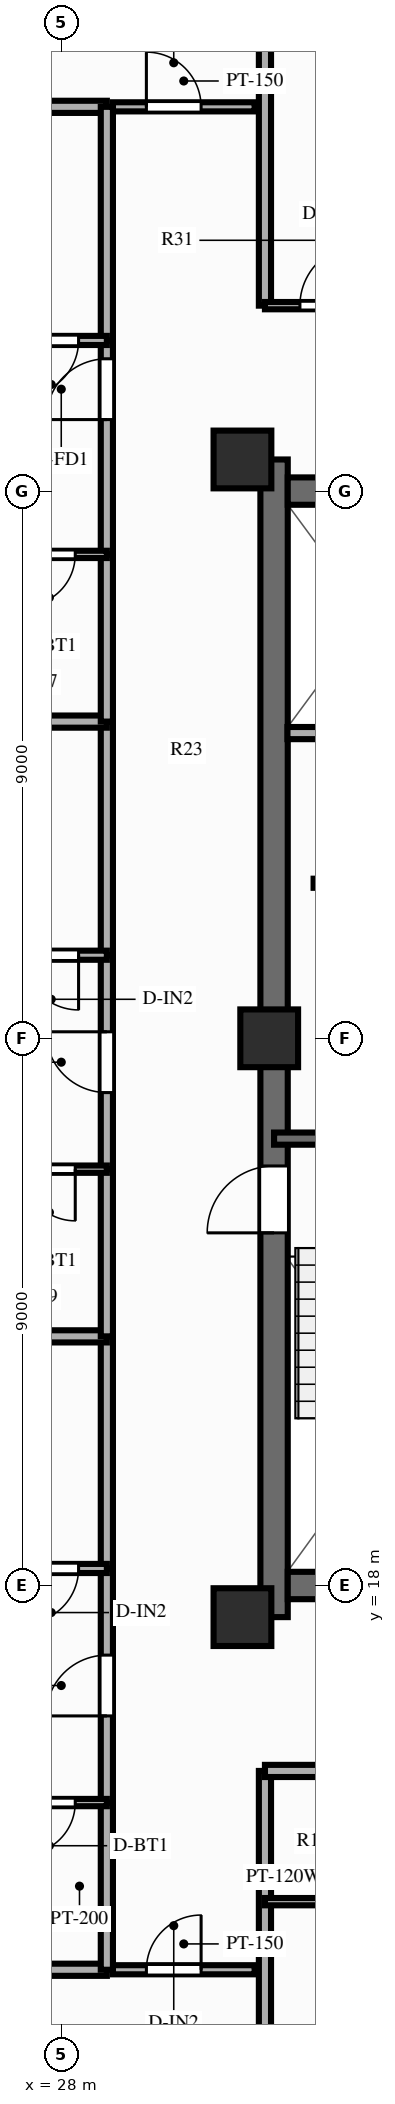
"""IFC4 building model, lengths in metres.
Left out: names, types, materials, properties, quantities, classifications, styles, units other than length and angle.
Written with IfcOpenShell. Run it as: python <this file> out.ifc"""

import sys

from ifc_helpers import new_model, si_unit, direction, frame, frame_2d, origin, origin_2d, place, context, subcontext, project, spatial, rectangle, extrude, source, transform, mapped, element, fill, save


model = new_model("IFC4")
c1 = context("Model", 3, precision=1e-05, world=origin(), true_north=direction((0.0, 1.0)))
c2 = subcontext(c1, "Body", "Model", "MODEL_VIEW")
j1 = project(units=[si_unit("LENGTHUNIT", "METRE"), si_unit("PLANEANGLEUNIT", "RADIAN")], contexts=[c1])
p1 = place(None, origin())
s1 = spatial("IfcSite", under=j1, at=p1, CompositionType="ELEMENT")
p2 = place(p1, origin())
s2 = spatial("IfcBuilding", under=s1, at=p2, CompositionType="ELEMENT")
p3 = place(p2, frame((0.0, 0.0, 216.3)))
s3 = spatial("IfcBuildingStorey", under=s2, at=p3, CompositionType="ELEMENT", Elevation=216.3)
p4 = place(p3, frame((31.5, 17.48, 0.0), z_axis=(0.0, 0.0, 1.0), x_axis=(0.0, 1.0, 0.0)))
e1 = element("IfcWall", 1, at=p4, inside=s3, PredefinedType="SHEAR", context=c2, shape_type="SweptSolid", body=[
    extrude(rectangle(XDim=19.04, YDim=0.45, at=frame_2d((9.52, 0.0))), origin(), (0.0, 0.0, 1.0), 3.9),
])
p5 = place(p4, frame((6.32, 0.0, 0.0)))
e2 = element("IfcOpeningElement", 2, at=p5, cuts=e1, PredefinedType="OPENING", context=c2, shape_type="SweptSolid", body=[
    extrude(rectangle(XDim=1.1, YDim=2.15, at=frame_2d((0.55, 1.075))), frame((0.0, 0.237, 0.0), z_axis=(0.0, -1.0, 0.0), x_axis=(1.0, 0.0, 0.0)), (0.0, 0.0, 1.0), 0.474),
])
p6 = place(p3, frame((31.725, 18.0, 0.0), z_axis=(0.0, 0.0, 1.0), x_axis=(1.0, 0.0, 0.0)))
e3 = element("IfcWall", 3, at=p6, inside=s3, PredefinedType="SHEAR", context=c2, shape_type="SweptSolid", body=[
    extrude(rectangle(XDim=12.55, YDim=0.45, at=frame_2d((6.275, 0.0))), origin(), (0.0, 0.0, 1.0), 3.9),
])
p7 = place(p3, frame((31.725, 36.0, 0.0), z_axis=(0.0, 0.0, 1.0), x_axis=(1.0, 0.0, 0.0)))
e4 = element("IfcWall", 4, at=p7, inside=s3, PredefinedType="SHEAR", context=c2, shape_type="SweptSolid", body=[
    extrude(rectangle(XDim=12.55, YDim=0.45, at=frame_2d((6.275, 0.0))), origin(), (0.0, 0.0, 1.0), 3.9),
])
p8 = place(p7, frame((5.225, 0.0, 0.0), z_axis=(0.0, 0.0, 1.0), x_axis=(-1.0, 0.0, 0.0)))
e5 = element("IfcOpeningElement", 5, at=p8, cuts=e4, PredefinedType="OPENING", context=c2, shape_type="SweptSolid", body=[
    extrude(rectangle(XDim=1.4, YDim=2.15, at=frame_2d((0.7, 1.075))), frame((0.0, 0.237, 0.0), z_axis=(0.0, -1.0, 0.0), x_axis=(1.0, 0.0, 0.0)), (0.0, 0.0, 1.0), 0.474),
])
m1 = source(origin(), c2, "Body", "SweptSolid", [
    extrude(rectangle(XDim=0.95, YDim=0.95, at=origin_2d()), origin(), (0.0, 0.0, 1.0), 3.9),
])
for number, where, z_axis, x_axis in (
    (6, (30.98, 17.48, 0.0), (0.0, 0.0, 1.0), (1.0, 0.0, 0.0)),
    (7, (30.98, 36.52, 0.0), (0.0, 0.0, 1.0), (1.0, 0.0, 0.0)),
    (8, (31.42, 27.0, 0.0), (0.0, 0.0, 1.0), (1.0, 0.0, 0.0)),
):
    element("IfcColumn", number, at=place(p3, frame(where, z_axis=z_axis, x_axis=x_axis)), inside=s3, PredefinedType="COLUMN", context=c2, shape_type="MappedRepresentation", body=[
        mapped(m1, transform((0.0, 0.0, 0.0), scale=1.0)),
    ])
p9 = place(p3, frame((32.15, 29.55, 0.0), z_axis=(0.0, 0.0, 1.0), x_axis=(1.0, 0.0, 0.0)))
e9 = element("IfcWall", 9, at=p9, inside=s3, PredefinedType="PARTITIONING", context=c2, shape_type="SweptSolid", body=[
    extrude(rectangle(XDim=2.27, YDim=0.15, at=frame_2d((1.135, 0.0))), origin(), (0.0, 0.0, 1.0), 3.56),
])
p10 = place(p3, frame((31.5, 25.35, 0.0), z_axis=(0.0, 0.0, 1.0), x_axis=(1.0, 0.0, 0.0)))
e10 = element("IfcWall", 10, at=p10, inside=s3, PredefinedType="SOLIDWALL", context=c2, shape_type="SweptSolid", body=[
    extrude(rectangle(XDim=3.93, YDim=0.2, at=frame_2d((1.965, 0.0))), origin(), (0.0, 0.0, 1.0), 3.69),
])
p11 = place(p3, frame((31.72, 32.02, 0.0), z_axis=(0.0, 0.0, 1.0), x_axis=(1.0, 0.0, 0.0)))
e11 = element("IfcWall", 11, at=p11, inside=s3, PredefinedType="PARTITIONING", context=c2, shape_type="SweptSolid", body=[
    extrude(rectangle(XDim=2.8, YDim=0.2, at=frame_2d((1.4, 0.0))), origin(), (0.0, 0.0, 1.0), 3.56),
])
p12 = place(p3, frame((28.85, 11.68, 0.0), z_axis=(0.0, 0.0, 1.0), x_axis=(1.0, 0.0, 0.0)))
e12 = element("IfcWall", 12, at=p12, inside=s3, PredefinedType="PARTITIONING", context=c2, shape_type="SweptSolid", body=[
    extrude(rectangle(XDim=2.33, YDim=0.15, at=frame_2d((1.165, 0.0))), origin(), (0.0, 0.0, 1.0), 2.24),
])
p13 = place(p12, frame((0.55, 0.0, 0.0)))
e13 = element("IfcOpeningElement", 13, at=p13, cuts=e12, PredefinedType="OPENING", context=c2, shape_type="SweptSolid", body=[
    extrude(rectangle(XDim=0.9, YDim=2.1, at=frame_2d((0.45, 1.05))), frame((0.0, 0.087, 0.0), z_axis=(0.0, -1.0, 0.0), x_axis=(1.0, 0.0, 0.0)), (0.0, 0.0, 1.0), 0.174),
])
p14 = place(p3, frame((28.85, 42.32, 0.0), z_axis=(0.0, 0.0, 1.0), x_axis=(1.0, 0.0, 0.0)))
e14 = element("IfcWall", 14, at=p14, inside=s3, PredefinedType="PARTITIONING", context=c2, shape_type="SweptSolid", body=[
    extrude(rectangle(XDim=2.33, YDim=0.15, at=frame_2d((1.165, 0.0))), origin(), (0.0, 0.0, 1.0), 2.24),
])
p15 = place(p14, frame((0.55, 0.0, 0.0)))
e15 = element("IfcOpeningElement", 15, at=p15, cuts=e14, PredefinedType="OPENING", context=c2, shape_type="SweptSolid", body=[
    extrude(rectangle(XDim=0.9, YDim=2.1, at=frame_2d((0.45, 1.05))), frame((0.0, 0.087, 0.0), z_axis=(0.0, -1.0, 0.0), x_axis=(1.0, 0.0, 0.0)), (0.0, 0.0, 1.0), 0.174),
])
p16 = place(p3, frame((31.35, 14.95, 0.0), z_axis=(0.0, 0.0, 1.0), x_axis=(0.0, -1.0, 0.0)))
e16 = element("IfcWall", 16, at=p16, inside=s3, PredefinedType="PARTITIONING", context=c2, shape_type="SweptSolid", body=[
    extrude(rectangle(XDim=8.8, YDim=0.2, at=frame_2d((4.4, 0.0))), origin(), (0.0, 0.0, 1.0), 2.44),
])
p17 = place(p3, frame((31.35, 14.95, 0.0), z_axis=(0.0, 0.0, 1.0), x_axis=(1.0, 0.0, 0.0)))
e17 = element("IfcWall", 17, at=p17, inside=s3, PredefinedType="PARTITIONING", context=c2, shape_type="SweptSolid", body=[
    extrude(rectangle(XDim=2.753, YDim=0.2, at=frame_2d((1.376, 0.0))), origin(), (0.0, 0.0, 1.0), 3.56),
])
p18 = place(p3, frame((31.35, 12.8, 0.0), z_axis=(0.0, 0.0, 1.0), x_axis=(1.0, 0.0, 0.0)))
e18 = element("IfcWall", 18, at=p18, inside=s3, PredefinedType="PARTITIONING", context=c2, shape_type="SweptSolid", body=[
    extrude(rectangle(XDim=2.753, YDim=0.12, at=frame_2d((1.376, 0.0))), origin(), (0.0, 0.0, 1.0), 3.56),
])
p19 = place(p3, frame((31.35, 39.05, 0.0), z_axis=(0.0, 0.0, 1.0), x_axis=(0.0, 1.0, 0.0)))
e19 = element("IfcWall", 19, at=p19, inside=s3, PredefinedType="PARTITIONING", context=c2, shape_type="SweptSolid", body=[
    extrude(rectangle(XDim=8.8, YDim=0.2, at=frame_2d((4.4, 0.0))), origin(), (0.0, 0.0, 1.0), 2.44),
])
p20 = place(p3, frame((31.35, 39.05, 0.0), z_axis=(0.0, 0.0, 1.0), x_axis=(1.0, 0.0, 0.0)))
e20 = element("IfcWall", 20, at=p20, inside=s3, PredefinedType="PARTITIONING", context=c2, shape_type="SweptSolid", body=[
    extrude(rectangle(XDim=2.15, YDim=0.12, at=frame_2d((1.075, 0.0))), origin(), (0.0, 0.0, 1.0), 3.56),
])
p21 = place(p20, frame((0.575, 0.0, 0.0)))
e21 = element("IfcOpeningElement", 21, at=p21, cuts=e20, PredefinedType="OPENING", context=c2, shape_type="SweptSolid", body=[
    extrude(rectangle(XDim=1.0, YDim=2.1, at=frame_2d((0.5, 1.05))), frame((0.0, 0.072, 0.0), z_axis=(0.0, -1.0, 0.0), x_axis=(1.0, 0.0, 0.0)), (0.0, 0.0, 1.0), 0.144),
])
for number, where, z_axis, x_axis in (
    (22, (28.75, 11.68, 0.0), (0.0, 0.0, 1.0), (-1.0, 0.0, 0.0)),
    (23, (28.75, 42.32, 0.0), (0.0, 0.0, 1.0), (-1.0, 0.0, 0.0)),
):
    element("IfcWall", number, at=place(p3, frame(where, z_axis=z_axis, x_axis=x_axis)), inside=s3, PredefinedType="PARTITIONING", context=c2, shape_type="SweptSolid", body=[
        extrude(rectangle(XDim=9.1, YDim=0.2, at=frame_2d((4.55, 0.0))), origin(), (0.0, 0.0, 1.0), 2.24),
    ])
p22 = place(p3, frame((28.75, 11.68, 0.0), z_axis=(0.0, 0.0, 1.0), x_axis=(0.0, 1.0, 0.0)))
e24 = element("IfcWall", 24, at=p22, inside=s3, PredefinedType="PARTITIONING", context=c2, shape_type="SweptSolid", body=[
    extrude(rectangle(XDim=2.75, YDim=0.2, at=frame_2d((1.375, 0.0))), origin(), (0.0, 0.0, 1.0), 3.56),
])
p23 = place(p3, frame((28.75, 14.43, 0.0), z_axis=(0.0, 0.0, 1.0), x_axis=(0.0, 1.0, 0.0)))
e25 = element("IfcWall", 25, at=p23, inside=s3, PredefinedType="PARTITIONING", context=c2, shape_type="SweptSolid", body=[
    extrude(rectangle(XDim=3.85, YDim=0.2, at=frame_2d((1.925, 0.0))), origin(), (0.0, 0.0, 1.0), 3.56),
])
p24 = place(p23, frame((1.425, 0.0, 0.0)))
e26 = element("IfcOpeningElement", 26, at=p24, cuts=e25, PredefinedType="OPENING", context=c2, shape_type="SweptSolid", body=[
    extrude(rectangle(XDim=1.0, YDim=2.15, at=frame_2d((0.5, 1.075))), frame((0.0, 0.112, 0.0), z_axis=(0.0, -1.0, 0.0), x_axis=(1.0, 0.0, 0.0)), (0.0, 0.0, 1.0), 0.224),
])
p25 = place(p3, frame((28.75, 18.28, 0.0), z_axis=(0.0, 0.0, 1.0), x_axis=(0.0, 1.0, 0.0)))
e27 = element("IfcWall", 27, at=p25, inside=s3, PredefinedType="PARTITIONING", context=c2, shape_type="SweptSolid", body=[
    extrude(rectangle(XDim=3.818, YDim=0.2, at=frame_2d((1.909, 0.0))), origin(), (0.0, 0.0, 1.0), 3.56),
])
p26 = place(p3, frame((28.75, 14.43, 0.0), z_axis=(0.0, 0.0, 1.0), x_axis=(-1.0, 0.0, 0.0)))
e28 = element("IfcWall", 28, at=p26, inside=s3, PredefinedType="PARTITIONING", context=c2, shape_type="SweptSolid", body=[
    extrude(rectangle(XDim=2.12, YDim=0.12, at=frame_2d((1.06, 0.0))), origin(), (0.0, 0.0, 1.0), 3.56),
])
p27 = place(p26, frame((0.52, 0.0, 0.0)))
e29 = element("IfcOpeningElement", 29, at=p27, cuts=e28, PredefinedType="OPENING", context=c2, shape_type="SweptSolid", body=[
    extrude(rectangle(XDim=0.85, YDim=2.05, at=frame_2d((0.425, 1.025))), frame((0.0, 0.072, 0.0), z_axis=(0.0, -1.0, 0.0), x_axis=(1.0, 0.0, 0.0)), (0.0, 0.0, 1.0), 0.144),
])
p28 = place(p3, frame((28.75, 18.28, 0.0), z_axis=(0.0, 0.0, 1.0), x_axis=(-1.0, 0.0, 0.0)))
e30 = element("IfcWall", 30, at=p28, inside=s3, PredefinedType="PARTITIONING", context=c2, shape_type="SweptSolid", body=[
    extrude(rectangle(XDim=3.18, YDim=0.15, at=frame_2d((1.59, 0.0))), origin(), (0.0, 0.0, 1.0), 3.56),
])
p29 = place(p28, frame((0.465, 0.0, 0.0)))
e31 = element("IfcOpeningElement", 31, at=p29, cuts=e30, PredefinedType="OPENING", context=c2, shape_type="SweptSolid", body=[
    extrude(rectangle(XDim=0.9, YDim=2.1, at=frame_2d((0.45, 1.05))), frame((0.0, 0.087, 0.0), z_axis=(0.0, -1.0, 0.0), x_axis=(1.0, 0.0, 0.0)), (0.0, 0.0, 1.0), 0.174),
])
p30 = place(p3, frame((28.75, 22.098, 0.0), z_axis=(0.0, 0.0, 1.0), x_axis=(-1.0, 0.0, 0.0)))
e32 = element("IfcWall", 32, at=p30, inside=s3, PredefinedType="PARTITIONING", context=c2, shape_type="SweptSolid", body=[
    extrude(rectangle(XDim=9.1, YDim=0.2, at=frame_2d((4.55, 0.0))), origin(), (0.0, 0.0, 1.0), 3.29),
])
p31 = place(p3, frame((28.75, 22.098, 0.0), z_axis=(0.0, 0.0, 1.0), x_axis=(0.0, 1.0, 0.0)))
e33 = element("IfcWall", 33, at=p31, inside=s3, PredefinedType="PARTITIONING", context=c2, shape_type="SweptSolid", body=[
    extrude(rectangle(XDim=2.75, YDim=0.2, at=frame_2d((1.375, 0.0))), origin(), (0.0, 0.0, 1.0), 3.56),
])
p32 = place(p3, frame((28.75, 24.848, 0.0), z_axis=(0.0, 0.0, 1.0), x_axis=(0.0, 1.0, 0.0)))
e34 = element("IfcWall", 34, at=p32, inside=s3, PredefinedType="PARTITIONING", context=c2, shape_type="SweptSolid", body=[
    extrude(rectangle(XDim=3.519, YDim=0.2, at=frame_2d((1.759, 0.0))), origin(), (0.0, 0.0, 1.0), 3.56),
])
p33 = place(p32, frame((1.26, 0.0, 0.0)))
e35 = element("IfcOpeningElement", 35, at=p33, cuts=e34, PredefinedType="OPENING", context=c2, shape_type="SweptSolid", body=[
    extrude(rectangle(XDim=1.0, YDim=2.15, at=frame_2d((0.5, 1.075))), frame((0.0, 0.112, 0.0), z_axis=(0.0, -1.0, 0.0), x_axis=(1.0, 0.0, 0.0)), (0.0, 0.0, 1.0), 0.224),
])
p34 = place(p3, frame((28.75, 28.366, 0.0), z_axis=(0.0, 0.0, 1.0), x_axis=(0.0, 1.0, 0.0)))
e36 = element("IfcWall", 36, at=p34, inside=s3, PredefinedType="PARTITIONING", context=c2, shape_type="SweptSolid", body=[
    extrude(rectangle(XDim=3.842, YDim=0.2, at=frame_2d((1.921, 0.0))), origin(), (0.0, 0.0, 1.0), 3.56),
])
p35 = place(p3, frame((28.75, 24.848, 0.0), z_axis=(0.0, 0.0, 1.0), x_axis=(-1.0, 0.0, 0.0)))
e37 = element("IfcWall", 37, at=p35, inside=s3, PredefinedType="PARTITIONING", context=c2, shape_type="SweptSolid", body=[
    extrude(rectangle(XDim=2.12, YDim=0.12, at=frame_2d((1.06, 0.0))), origin(), (0.0, 0.0, 1.0), 3.56),
])
p36 = place(p35, frame((0.52, 0.0, 0.0)))
e38 = element("IfcOpeningElement", 38, at=p36, cuts=e37, PredefinedType="OPENING", context=c2, shape_type="SweptSolid", body=[
    extrude(rectangle(XDim=0.85, YDim=2.05, at=frame_2d((0.425, 1.025))), frame((0.0, 0.072, 0.0), z_axis=(0.0, -1.0, 0.0), x_axis=(1.0, 0.0, 0.0)), (0.0, 0.0, 1.0), 0.144),
])
p37 = place(p3, frame((28.75, 28.366, 0.0), z_axis=(0.0, 0.0, 1.0), x_axis=(-1.0, 0.0, 0.0)))
e39 = element("IfcWall", 39, at=p37, inside=s3, PredefinedType="PARTITIONING", context=c2, shape_type="SweptSolid", body=[
    extrude(rectangle(XDim=3.18, YDim=0.15, at=frame_2d((1.59, 0.0))), origin(), (0.0, 0.0, 1.0), 3.56),
])
p38 = place(p37, frame((0.465, 0.0, 0.0)))
e40 = element("IfcOpeningElement", 40, at=p38, cuts=e39, PredefinedType="OPENING", context=c2, shape_type="SweptSolid", body=[
    extrude(rectangle(XDim=0.9, YDim=2.1, at=frame_2d((0.45, 1.05))), frame((0.0, 0.087, 0.0), z_axis=(0.0, -1.0, 0.0), x_axis=(1.0, 0.0, 0.0)), (0.0, 0.0, 1.0), 0.174),
])
p39 = place(p3, frame((28.75, 32.209, 0.0), z_axis=(0.0, 0.0, 1.0), x_axis=(-1.0, 0.0, 0.0)))
e41 = element("IfcWall", 41, at=p39, inside=s3, PredefinedType="PARTITIONING", context=c2, shape_type="SweptSolid", body=[
    extrude(rectangle(XDim=9.1, YDim=0.2, at=frame_2d((4.55, 0.0))), origin(), (0.0, 0.0, 1.0), 3.29),
])
p40 = place(p3, frame((28.75, 32.209, 0.0), z_axis=(0.0, 0.0, 1.0), x_axis=(0.0, 1.0, 0.0)))
e42 = element("IfcWall", 42, at=p40, inside=s3, PredefinedType="PARTITIONING", context=c2, shape_type="SweptSolid", body=[
    extrude(rectangle(XDim=2.75, YDim=0.2, at=frame_2d((1.375, 0.0))), origin(), (0.0, 0.0, 1.0), 3.56),
])
p41 = place(p3, frame((28.75, 34.959, 0.0), z_axis=(0.0, 0.0, 1.0), x_axis=(0.0, 1.0, 0.0)))
e43 = element("IfcWall", 43, at=p41, inside=s3, PredefinedType="PARTITIONING", context=c2, shape_type="SweptSolid", body=[
    extrude(rectangle(XDim=3.519, YDim=0.2, at=frame_2d((1.76, 0.0))), origin(), (0.0, 0.0, 1.0), 3.56),
])
p42 = place(p41, frame((2.217, 0.0, 0.0)))
e44 = element("IfcOpeningElement", 44, at=p42, cuts=e43, PredefinedType="OPENING", context=c2, shape_type="SweptSolid", body=[
    extrude(rectangle(XDim=1.0, YDim=2.15, at=frame_2d((0.5, 1.075))), frame((0.0, 0.112, 0.0), z_axis=(0.0, -1.0, 0.0), x_axis=(1.0, 0.0, 0.0)), (0.0, 0.0, 1.0), 0.224),
])
p43 = place(p3, frame((28.75, 38.478, 0.0), z_axis=(0.0, 0.0, 1.0), x_axis=(0.0, 1.0, 0.0)))
e45 = element("IfcWall", 45, at=p43, inside=s3, PredefinedType="PARTITIONING", context=c2, shape_type="SweptSolid", body=[
    extrude(rectangle(XDim=3.842, YDim=0.2, at=frame_2d((1.921, 0.0))), origin(), (0.0, 0.0, 1.0), 3.56),
])
p44 = place(p3, frame((28.75, 34.959, 0.0), z_axis=(0.0, 0.0, 1.0), x_axis=(-1.0, 0.0, 0.0)))
e46 = element("IfcWall", 46, at=p44, inside=s3, PredefinedType="PARTITIONING", context=c2, shape_type="SweptSolid", body=[
    extrude(rectangle(XDim=2.12, YDim=0.12, at=frame_2d((1.06, 0.0))), origin(), (0.0, 0.0, 1.0), 3.56),
])
p45 = place(p44, frame((0.52, 0.0, 0.0)))
e47 = element("IfcOpeningElement", 47, at=p45, cuts=e46, PredefinedType="OPENING", context=c2, shape_type="SweptSolid", body=[
    extrude(rectangle(XDim=0.85, YDim=2.05, at=frame_2d((0.425, 1.025))), frame((0.0, 0.072, 0.0), z_axis=(0.0, -1.0, 0.0), x_axis=(1.0, 0.0, 0.0)), (0.0, 0.0, 1.0), 0.144),
])
p46 = place(p3, frame((28.75, 38.478, 0.0), z_axis=(0.0, 0.0, 1.0), x_axis=(-1.0, 0.0, 0.0)))
e48 = element("IfcWall", 48, at=p46, inside=s3, PredefinedType="PARTITIONING", context=c2, shape_type="SweptSolid", body=[
    extrude(rectangle(XDim=3.18, YDim=0.15, at=frame_2d((1.59, 0.0))), origin(), (0.0, 0.0, 1.0), 3.56),
])
p47 = place(p46, frame((0.465, 0.0, 0.0)))
e49 = element("IfcOpeningElement", 49, at=p47, cuts=e48, PredefinedType="OPENING", context=c2, shape_type="SweptSolid", body=[
    extrude(rectangle(XDim=0.9, YDim=2.1, at=frame_2d((0.45, 1.05))), frame((0.0, 0.087, 0.0), z_axis=(0.0, -1.0, 0.0), x_axis=(1.0, 0.0, 0.0)), (0.0, 0.0, 1.0), 0.174),
])
m2 = source(origin(), c2, "Body", "SweptSolid", [
    extrude(rectangle(XDim=1.1, YDim=2.15, at=frame_2d((0.55, 1.075))), frame((0.0, 0.025, 0.0), z_axis=(0.0, -1.0, 0.0), x_axis=(1.0, 0.0, 0.0)), (0.0, 0.0, 1.0), 0.05),
])
p48 = place(p5, origin())
e50 = element("IfcDoor", 50, at=p48, inside=s3, OperationType="SINGLE_SWING_LEFT", PredefinedType="DOOR", context=c2, shape_type="MappedRepresentation", body=[
    mapped(m2, transform((0.0, 0.0, 0.0), scale=1.0)),
])
fill(e2, e50)
m3 = source(origin(), c2, "Body", "SweptSolid", [
    extrude(rectangle(XDim=0.9, YDim=2.1, at=frame_2d((0.45, 1.05))), frame((0.0, 0.025, 0.0), z_axis=(0.0, -1.0, 0.0), x_axis=(1.0, 0.0, 0.0)), (0.0, 0.0, 1.0), 0.05),
])
p49 = place(p13, origin())
e51 = element("IfcDoor", 51, at=p49, inside=s3, OperationType="SINGLE_SWING_RIGHT", PredefinedType="DOOR", context=c2, shape_type="MappedRepresentation", body=[
    mapped(m3, transform((0.0, 0.0, 0.0), scale=1.0)),
])
fill(e13, e51)
p50 = place(p15, origin())
e52 = element("IfcDoor", 52, at=p50, inside=s3, OperationType="SINGLE_SWING_LEFT", PredefinedType="DOOR", context=c2, shape_type="MappedRepresentation", body=[
    mapped(m3, transform((0.0, 0.0, 0.0), scale=1.0)),
])
fill(e15, e52)
m4 = source(origin(), c2, "Body", "SweptSolid", [
    extrude(rectangle(XDim=1.0, YDim=2.1, at=frame_2d((0.5, 1.05))), frame((0.0, 0.025, 0.0), z_axis=(0.0, -1.0, 0.0), x_axis=(1.0, 0.0, 0.0)), (0.0, 0.0, 1.0), 0.05),
])
p51 = place(p21, origin())
e53 = element("IfcDoor", 53, at=p51, inside=s3, OperationType="SINGLE_SWING_RIGHT", PredefinedType="DOOR", context=c2, shape_type="MappedRepresentation", body=[
    mapped(m4, transform((0.0, 0.0, 0.0), scale=1.0)),
])
fill(e21, e53)
m5 = source(origin(), c2, "Body", "SweptSolid", [
    extrude(rectangle(XDim=1.0, YDim=2.15, at=frame_2d((0.5, 1.075))), frame((0.0, 0.025, 0.0), z_axis=(0.0, -1.0, 0.0), x_axis=(1.0, 0.0, 0.0)), (0.0, 0.0, 1.0), 0.05),
])
p52 = place(p24, origin())
e54 = element("IfcDoor", 54, at=p52, inside=s3, OperationType="SINGLE_SWING_LEFT", PredefinedType="DOOR", context=c2, shape_type="MappedRepresentation", body=[
    mapped(m5, transform((0.0, 0.0, 0.0), scale=1.0)),
])
fill(e26, e54)
m6 = source(origin(), c2, "Body", "SweptSolid", [
    extrude(rectangle(XDim=0.85, YDim=2.05, at=frame_2d((0.425, 1.025))), frame((0.0, 0.025, 0.0), z_axis=(0.0, -1.0, 0.0), x_axis=(1.0, 0.0, 0.0)), (0.0, 0.0, 1.0), 0.05),
])
p53 = place(p27, origin())
e55 = element("IfcDoor", 55, at=p53, inside=s3, OperationType="SINGLE_SWING_RIGHT", PredefinedType="DOOR", context=c2, shape_type="MappedRepresentation", body=[
    mapped(m6, transform((0.0, 0.0, 0.0), scale=1.0)),
])
fill(e29, e55)
p54 = place(p29, origin())
e56 = element("IfcDoor", 56, at=p54, inside=s3, OperationType="SINGLE_SWING_RIGHT", PredefinedType="DOOR", context=c2, shape_type="MappedRepresentation", body=[
    mapped(m3, transform((0.0, 0.0, 0.0), scale=1.0)),
])
fill(e31, e56)
p55 = place(p33, origin())
e57 = element("IfcDoor", 57, at=p55, inside=s3, OperationType="SINGLE_SWING_RIGHT", PredefinedType="DOOR", context=c2, shape_type="MappedRepresentation", body=[
    mapped(m5, transform((0.0, 0.0, 0.0), scale=1.0)),
])
fill(e35, e57)
p56 = place(p36, origin())
e58 = element("IfcDoor", 58, at=p56, inside=s3, OperationType="SINGLE_SWING_LEFT", PredefinedType="DOOR", context=c2, shape_type="MappedRepresentation", body=[
    mapped(m6, transform((0.0, 0.0, 0.0), scale=1.0)),
])
fill(e38, e58)
p57 = place(p38, origin())
e59 = element("IfcDoor", 59, at=p57, inside=s3, OperationType="SINGLE_SWING_LEFT", PredefinedType="DOOR", context=c2, shape_type="MappedRepresentation", body=[
    mapped(m3, transform((0.0, 0.0, 0.0), scale=1.0)),
])
fill(e40, e59)
p58 = place(p42, origin())
e60 = element("IfcDoor", 60, at=p58, inside=s3, OperationType="SINGLE_SWING_LEFT", PredefinedType="DOOR", context=c2, shape_type="MappedRepresentation", body=[
    mapped(m5, transform((0.0, 0.0, 0.0), scale=1.0)),
])
fill(e44, e60)
p59 = place(p45, origin())
e61 = element("IfcDoor", 61, at=p59, inside=s3, OperationType="SINGLE_SWING_RIGHT", PredefinedType="DOOR", context=c2, shape_type="MappedRepresentation", body=[
    mapped(m6, transform((0.0, 0.0, 0.0), scale=1.0)),
])
fill(e47, e61)
p60 = place(p47, origin())
e62 = element("IfcDoor", 62, at=p60, inside=s3, OperationType="SINGLE_SWING_RIGHT", PredefinedType="DOOR", context=c2, shape_type="MappedRepresentation", body=[
    mapped(m3, transform((0.0, 0.0, 0.0), scale=1.0)),
])
fill(e49, e62)
save(model, sys.argv[1])
